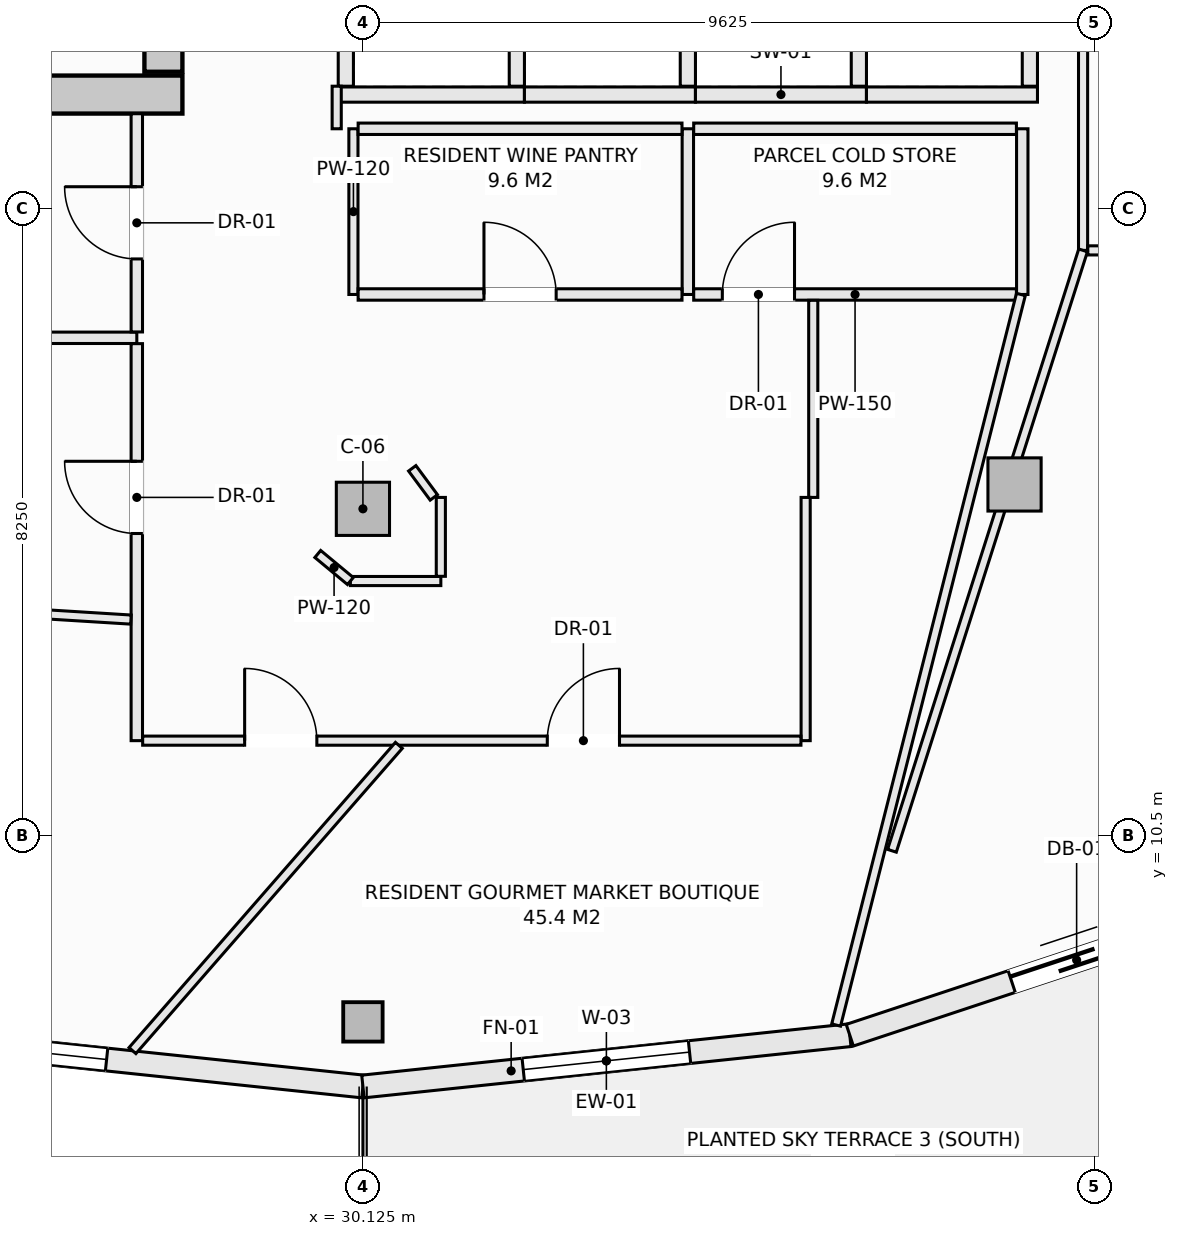
"""IFC4 building model, lengths in metres.
Left out: names, types, materials, properties, quantities, classifications, styles, units other than length and angle.
Written with IfcOpenShell. Run it as: python <this file> out.ifc"""

import sys

from ifc_helpers import new_model, si_unit, direction, frame, frame_2d, origin, origin_2d, place, context, subcontext, project, spatial, rectangle, hollow_rectangle, extrude, element, fill, save


model = new_model("IFC4")
c1 = context("Model", 3, precision=1e-05, world=origin(), true_north=direction((0.0, 1.0)))
c2 = subcontext(c1, "Body", "Model", "MODEL_VIEW")
j1 = project(units=[si_unit("LENGTHUNIT", "METRE"), si_unit("PLANEANGLEUNIT", "RADIAN")], contexts=[c1])
p1 = place(None, origin())
s1 = spatial("IfcSite", under=j1, at=p1, CompositionType="ELEMENT")
p2 = place(p1, origin())
s2 = spatial("IfcBuilding", under=s1, at=p2, CompositionType="ELEMENT")
p3 = place(p2, frame((0.0, 0.0, 236.0)))
s3 = spatial("IfcBuildingStorey", under=s2, at=p3, CompositionType="ELEMENT", Elevation=236.0)
p4 = place(p3, frame((14.25, 20.25, -0.27), z_axis=(0.0, 0.0, 1.0), x_axis=(1.0, 0.0, 0.0)))
e1 = element("IfcWall", 1, at=p4, inside=s3, PredefinedType="SHEAR", context=c2, shape_type="SweptSolid", body=[
    extrude(rectangle(XDim=13.5, YDim=0.5, at=frame_2d((6.75, 0.0))), origin(), (0.0, 0.0, 1.0), 3.3),
])
p5 = place(p3, frame((27.5, 20.55, -0.27), z_axis=(0.0, 0.0, 1.0), x_axis=(0.0, 1.0, 0.0)))
e2 = element("IfcWall", 2, at=p5, inside=s3, PredefinedType="SHEAR", context=c2, shape_type="SweptSolid", body=[
    extrude(rectangle(XDim=1.5, YDim=0.5, at=frame_2d((0.75, 0.0))), origin(), (0.0, 0.0, 1.0), 3.3),
])
p6 = place(p3, frame((30.125, 8.05, -0.27), z_axis=(0.0, 0.0, 1.0), x_axis=(1.0, 0.0, 0.0)))
e3 = element("IfcColumn", 3, at=p6, inside=s3, PredefinedType="COLUMN", context=c2, shape_type="SweptSolid", body=[
    extrude(hollow_rectangle(XDim=0.508, YDim=0.508, WallThickness=0.019, at=origin_2d()), origin(), (0.0, 0.0, 1.0), 3.3),
])
for number, where, z_axis, x_axis in (
    (4, (30.125, 14.8, -0.27), (0.0, 0.0, 1.0), (1.0, 0.0, 0.0)),
    (5, (38.698, 15.121, -0.27), (0.0, 0.0, 1.0), (1.0, 0.0, 0.0)),
):
    element("IfcColumn", number, at=place(p3, frame(where, z_axis=z_axis, x_axis=x_axis)), inside=s3, PredefinedType="COLUMN", context=c2, shape_type="SweptSolid", body=[
        extrude(rectangle(XDim=0.7, YDim=0.7, at=origin_2d()), origin(), (0.0, 0.0, 1.0), 3.3),
    ])
p7 = place(p3, frame((23.719, 7.875, 0.0), z_axis=(0.0, 0.0, 1.0), x_axis=(0.994497142298, -0.104763705363, 0.0)))
e6 = element("IfcWall", 6, at=p7, inside=s3, PredefinedType="SOLIDWALL", context=c2, shape_type="SweptSolid", body=[
    extrude(rectangle(XDim=6.441, YDim=0.3, at=frame_2d((3.221, 0.0))), origin(), (0.0, 0.0, 1.0), 2.605),
])
p8 = place(p7, frame((0.85, 0.0, 0.72)))
e7 = element("IfcOpeningElement", 7, at=p8, cuts=e6, PredefinedType="OPENING", context=c2, shape_type="SweptSolid", body=[
    extrude(rectangle(XDim=2.2, YDim=1.65, at=frame_2d((1.1, 0.825))), frame((0.0, 0.16, 0.0), z_axis=(0.0, -1.0, 0.0), x_axis=(1.0, 0.0, 0.0)), (0.0, 0.0, 1.0), 0.32),
])
p9 = place(p3, frame((30.125, 7.2, 0.0), z_axis=(0.0, 0.0, 1.0), x_axis=(0.994497142298, 0.104763705363, 0.0)))
e8 = element("IfcWall", 8, at=p9, inside=s3, PredefinedType="SOLIDWALL", context=c2, shape_type="SweptSolid", body=[
    extrude(rectangle(XDim=6.441, YDim=0.3, at=frame_2d((3.221, 0.0))), origin(), (0.0, 0.0, 1.0), 2.605),
])
p10 = place(p9, frame((2.121, 0.0, 0.72)))
e9 = element("IfcOpeningElement", 9, at=p10, cuts=e8, PredefinedType="OPENING", context=c2, shape_type="SweptSolid", body=[
    extrude(rectangle(XDim=2.2, YDim=1.65, at=frame_2d((1.1, 0.825))), frame((0.0, 0.16, 0.0), z_axis=(0.0, -1.0, 0.0), x_axis=(1.0, 0.0, 0.0)), (0.0, 0.0, 1.0), 0.32),
])
p11 = place(p3, frame((36.531, 7.875, 0.0), z_axis=(0.0, 0.0, 1.0), x_axis=(0.949240877604, 0.314550085495, 0.0)))
e10 = element("IfcWall", 10, at=p11, inside=s3, PredefinedType="SOLIDWALL", context=c2, shape_type="SweptSolid", body=[
    extrude(rectangle(XDim=6.288, YDim=0.3, at=frame_2d((3.144, 0.0))), origin(), (0.0, 0.0, 1.0), 2.605),
])
p12 = place(p11, frame((2.244, 0.0, 0.0)))
e11 = element("IfcOpeningElement", 11, at=p12, cuts=e10, PredefinedType="OPENING", context=c2, shape_type="SweptSolid", body=[
    extrude(rectangle(XDim=1.8, YDim=2.25, at=frame_2d((0.9, 1.125))), frame((0.0, 0.16, 0.0), z_axis=(0.0, -1.0, 0.0), x_axis=(1.0, 0.0, 0.0)), (0.0, 0.0, 1.0), 0.32),
])
p13 = place(p3, frame((37.565, 4.653, 0.0), z_axis=(0.0, 0.0, 1.0), x_axis=(0.941780086523, 0.336229488042, 0.0)))
e12 = element("IfcWall", 12, at=p13, inside=s3, PredefinedType="PARAPET", context=c2, shape_type="SweptSolid", body=[
    extrude(rectangle(XDim=7.378, YDim=0.22, at=frame_2d((3.689, 0.0))), origin(), (0.0, 0.0, 1.0), 0.52),
])
p14 = place(p3, frame((29.8, 20.25, 0.0), z_axis=(0.0, 0.0, 1.0), x_axis=(1.0, 0.0, 0.0)))
e13 = element("IfcWall", 13, at=p14, inside=s3, PredefinedType="SOLIDWALL", context=c2, shape_type="SweptSolid", body=[
    extrude(rectangle(XDim=2.45, YDim=0.2, at=frame_2d((1.225, 0.0))), origin(), (0.0, 0.0, 1.0), 3.03),
])
for number, where, z_axis, x_axis in (
    (14, (29.9, 20.36, 0.0), (0.0, 0.0, 1.0), (0.0, 1.0, 0.0)),
    (15, (32.15, 20.36, 0.0), (0.0, 0.0, 1.0), (0.0, 1.0, 0.0)),
):
    element("IfcWall", number, at=place(p3, frame(where, z_axis=z_axis, x_axis=x_axis)), inside=s3, PredefinedType="SOLIDWALL", context=c2, shape_type="SweptSolid", body=[
        extrude(rectangle(XDim=2.43, YDim=0.2, at=frame_2d((1.215, 0.0))), origin(), (0.0, 0.0, 1.0), 3.03),
    ])
p15 = place(p3, frame((32.25, 20.25, 0.0), z_axis=(0.0, 0.0, 1.0), x_axis=(1.0, 0.0, 0.0)))
e16 = element("IfcWall", 16, at=p15, inside=s3, PredefinedType="SOLIDWALL", context=c2, shape_type="SweptSolid", body=[
    extrude(rectangle(XDim=2.25, YDim=0.2, at=frame_2d((1.125, 0.0))), origin(), (0.0, 0.0, 1.0), 3.03),
])
p16 = place(p3, frame((34.4, 20.36, 0.0), z_axis=(0.0, 0.0, 1.0), x_axis=(0.0, 1.0, 0.0)))
e17 = element("IfcWall", 17, at=p16, inside=s3, PredefinedType="SOLIDWALL", context=c2, shape_type="SweptSolid", body=[
    extrude(rectangle(XDim=2.43, YDim=0.2, at=frame_2d((1.215, 0.0))), origin(), (0.0, 0.0, 1.0), 3.03),
])
p17 = place(p3, frame((34.5, 20.25, 0.0), z_axis=(0.0, 0.0, 1.0), x_axis=(1.0, 0.0, 0.0)))
e18 = element("IfcWall", 18, at=p17, inside=s3, PredefinedType="SOLIDWALL", context=c2, shape_type="SweptSolid", body=[
    extrude(rectangle(XDim=2.25, YDim=0.2, at=frame_2d((1.125, 0.0))), origin(), (0.0, 0.0, 1.0), 3.03),
])
p18 = place(p3, frame((36.65, 20.36, 0.0), z_axis=(0.0, 0.0, 1.0), x_axis=(0.0, 1.0, 0.0)))
e19 = element("IfcWall", 19, at=p18, inside=s3, PredefinedType="SOLIDWALL", context=c2, shape_type="SweptSolid", body=[
    extrude(rectangle(XDim=2.43, YDim=0.2, at=frame_2d((1.215, 0.0))), origin(), (0.0, 0.0, 1.0), 3.03),
])
p19 = place(p3, frame((36.75, 20.25, 0.0), z_axis=(0.0, 0.0, 1.0), x_axis=(1.0, 0.0, 0.0)))
e20 = element("IfcWall", 20, at=p19, inside=s3, PredefinedType="SOLIDWALL", context=c2, shape_type="SweptSolid", body=[
    extrude(rectangle(XDim=2.25, YDim=0.2, at=frame_2d((1.125, 0.0))), origin(), (0.0, 0.0, 1.0), 3.03),
])
p20 = place(p3, frame((38.9, 20.36, 0.0), z_axis=(0.0, 0.0, 1.0), x_axis=(0.0, 1.0, 0.0)))
e21 = element("IfcWall", 21, at=p20, inside=s3, PredefinedType="SOLIDWALL", context=c2, shape_type="SweptSolid", body=[
    extrude(rectangle(XDim=2.43, YDim=0.2, at=frame_2d((1.215, 0.0))), origin(), (0.0, 0.0, 1.0), 3.03),
])
p21 = place(p3, frame((22.15, 17.05, 0.0), z_axis=(0.0, 0.0, 1.0), x_axis=(1.0, 0.0, 0.0)))
e22 = element("IfcWall", 22, at=p21, inside=s3, PredefinedType="PARTITIONING", context=c2, shape_type="SweptSolid", body=[
    extrude(rectangle(XDim=5.0, YDim=0.15, at=frame_2d((2.5, 0.0))), origin(), (0.0, 0.0, 1.0), 3.03),
])
p22 = place(p3, frame((27.15, 11.75, 0.0), z_axis=(0.0, 0.0, 1.0), x_axis=(0.0, 1.0, 0.0)))
e23 = element("IfcWall", 23, at=p22, inside=s3, PredefinedType="PARTITIONING", context=c2, shape_type="SweptSolid", body=[
    extrude(rectangle(XDim=5.223, YDim=0.15, at=frame_2d((2.611, 0.0))), origin(), (0.0, 0.0, 1.0), 3.03),
])
p23 = place(p22, frame((2.725, 0.0, 0.0)))
e24 = element("IfcOpeningElement", 24, at=p23, cuts=e23, PredefinedType="OPENING", context=c2, shape_type="SweptSolid", body=[
    extrude(rectangle(XDim=0.95, YDim=2.1, at=frame_2d((0.475, 1.05))), frame((0.0, 0.085, 0.0), z_axis=(0.0, -1.0, 0.0), x_axis=(1.0, 0.0, 0.0)), (0.0, 0.0, 1.0), 0.17),
])
p24 = place(p3, frame((27.15, 17.127, 0.0), z_axis=(0.0, 0.0, 1.0), x_axis=(0.0, 1.0, 0.0)))
e25 = element("IfcWall", 25, at=p24, inside=s3, PredefinedType="PARTITIONING", context=c2, shape_type="SweptSolid", body=[
    extrude(rectangle(XDim=2.871, YDim=0.15, at=frame_2d((1.436, 0.0))), origin(), (0.0, 0.0, 1.0), 3.03),
])
p25 = place(p24, frame((0.96, 0.0, 0.0)))
e26 = element("IfcOpeningElement", 26, at=p25, cuts=e25, PredefinedType="OPENING", context=c2, shape_type="SweptSolid", body=[
    extrude(rectangle(XDim=0.95, YDim=2.1, at=frame_2d((0.475, 1.05))), frame((0.0, 0.085, 0.0), z_axis=(0.0, -1.0, 0.0), x_axis=(1.0, 0.0, 0.0)), (0.0, 0.0, 1.0), 0.17),
])
p26 = place(p3, frame((30.0, 17.62, 0.0), z_axis=(0.0, 0.0, 1.0), x_axis=(0.0, 1.0, 0.0)))
e27 = element("IfcWall", 27, at=p26, inside=s3, PredefinedType="PARTITIONING", context=c2, shape_type="SweptSolid", body=[
    extrude(rectangle(XDim=2.18, YDim=0.12, at=frame_2d((1.09, 0.0))), origin(), (0.0, 0.0, 1.0), 3.03),
])
for number, where, z_axis, x_axis in (
    (28, (38.8, 17.62, 0.0), (0.0, 0.0, 1.0), (0.0, 1.0, 0.0)),
    (29, (34.4, 17.62, 0.0), (0.0, 0.0, 1.0), (0.0, 1.0, 0.0)),
):
    element("IfcWall", number, at=place(p3, frame(where, z_axis=z_axis, x_axis=x_axis)), inside=s3, PredefinedType="PARTITIONING", context=c2, shape_type="SweptSolid", body=[
        extrude(rectangle(XDim=2.18, YDim=0.15, at=frame_2d((1.09, 0.0))), origin(), (0.0, 0.0, 1.0), 3.03),
    ])
p27 = place(p3, frame((30.062, 17.62, 0.0), z_axis=(0.0, 0.0, 1.0), x_axis=(1.0, 0.0, 0.0)))
e30 = element("IfcWall", 30, at=p27, inside=s3, PredefinedType="PARTITIONING", context=c2, shape_type="SweptSolid", body=[
    extrude(rectangle(XDim=4.261, YDim=0.15, at=frame_2d((2.13, 0.0))), origin(), (0.0, 0.0, 1.0), 3.03),
])
p28 = place(p27, frame((1.656, 0.0, 0.0)))
e31 = element("IfcOpeningElement", 31, at=p28, cuts=e30, PredefinedType="OPENING", context=c2, shape_type="SweptSolid", body=[
    extrude(rectangle(XDim=0.95, YDim=2.1, at=frame_2d((0.475, 1.05))), frame((0.0, 0.085, 0.0), z_axis=(0.0, -1.0, 0.0), x_axis=(1.0, 0.0, 0.0)), (0.0, 0.0, 1.0), 0.17),
])
p29 = place(p3, frame((34.477, 17.62, 0.0), z_axis=(0.0, 0.0, 1.0), x_axis=(1.0, 0.0, 0.0)))
e32 = element("IfcWall", 32, at=p29, inside=s3, PredefinedType="PARTITIONING", context=c2, shape_type="SweptSolid", body=[
    extrude(rectangle(XDim=4.246, YDim=0.15, at=frame_2d((2.123, 0.0))), origin(), (0.0, 0.0, 1.0), 3.03),
])
p30 = place(p29, frame((0.376, 0.0, 0.0)))
e33 = element("IfcOpeningElement", 33, at=p30, cuts=e32, PredefinedType="OPENING", context=c2, shape_type="SweptSolid", body=[
    extrude(rectangle(XDim=0.95, YDim=2.1, at=frame_2d((0.475, 1.05))), frame((0.0, 0.085, 0.0), z_axis=(0.0, -1.0, 0.0), x_axis=(1.0, 0.0, 0.0)), (0.0, 0.0, 1.0), 0.17),
])
p31 = place(p3, frame((30.062, 19.8, 0.0), z_axis=(0.0, 0.0, 1.0), x_axis=(1.0, 0.0, 0.0)))
e34 = element("IfcWall", 34, at=p31, inside=s3, PredefinedType="PARTITIONING", context=c2, shape_type="SweptSolid", body=[
    extrude(rectangle(XDim=4.261, YDim=0.15, at=frame_2d((2.13, 0.0))), origin(), (0.0, 0.0, 1.0), 3.03),
])
p32 = place(p3, frame((34.477, 19.8, 0.0), z_axis=(0.0, 0.0, 1.0), x_axis=(1.0, 0.0, 0.0)))
e35 = element("IfcWall", 35, at=p32, inside=s3, PredefinedType="PARTITIONING", context=c2, shape_type="SweptSolid", body=[
    extrude(rectangle(XDim=4.246, YDim=0.15, at=frame_2d((2.123, 0.0))), origin(), (0.0, 0.0, 1.0), 3.03),
])
p33 = place(p3, frame((39.6, 18.2, 0.0), z_axis=(0.0, 0.0, 1.0), x_axis=(0.0, 1.0, 0.0)))
e36 = element("IfcWall", 36, at=p33, inside=s3, PredefinedType="PARTITIONING", context=c2, shape_type="SweptSolid", body=[
    extrude(rectangle(XDim=4.82, YDim=0.12, at=frame_2d((2.41, 0.0))), origin(), (0.0, 0.0, 1.0), 3.03),
])
p34 = place(p3, frame((39.662, 18.2, 0.0), z_axis=(0.0, 0.0, 1.0), x_axis=(1.0, 0.0, 0.0)))
e37 = element("IfcWall", 37, at=p34, inside=s3, PredefinedType="PARTITIONING", context=c2, shape_type="SweptSolid", body=[
    extrude(rectangle(XDim=1.796, YDim=0.12, at=frame_2d((0.898, 0.0))), origin(), (0.0, 0.0, 1.0), 2.77),
])
p35 = place(p3, frame((29.78, 19.8, 0.0), z_axis=(0.0, 0.0, 1.0), x_axis=(0.0, 1.0, 0.0)))
e38 = element("IfcWall", 38, at=p35, inside=s3, PredefinedType="PARTITIONING", context=c2, shape_type="SweptSolid", body=[
    extrude(rectangle(XDim=0.56, YDim=0.12, at=frame_2d((0.28, 0.0))), origin(), (0.0, 0.0, 1.0), 3.03),
])
p36 = place(p3, frame((36.05, 14.95, 0.0), z_axis=(0.0, 0.0, 1.0), x_axis=(0.0, 1.0, 0.0)))
e39 = element("IfcWall", 39, at=p36, inside=s3, PredefinedType="PARTITIONING", context=c2, shape_type="SweptSolid", body=[
    extrude(rectangle(XDim=2.593, YDim=0.12, at=frame_2d((1.296, 0.0))), origin(), (0.0, 0.0, 1.0), 3.03),
])
p37 = place(p3, frame((35.95, 11.75, 0.0), z_axis=(0.0, 0.0, 1.0), x_axis=(0.0, 1.0, 0.0)))
e40 = element("IfcWall", 40, at=p37, inside=s3, PredefinedType="PARTITIONING", context=c2, shape_type="SweptSolid", body=[
    extrude(rectangle(XDim=3.2, YDim=0.12, at=frame_2d((1.6, 0.0))), origin(), (0.0, 0.0, 1.0), 3.03),
])
p38 = place(p3, frame((27.227, 11.75, 0.0), z_axis=(0.0, 0.0, 1.0), x_axis=(1.0, 0.0, 0.0)))
e41 = element("IfcWall", 41, at=p38, inside=s3, PredefinedType="PARTITIONING", context=c2, shape_type="SweptSolid", body=[
    extrude(rectangle(XDim=8.661, YDim=0.12, at=frame_2d((4.331, 0.0))), origin(), (0.0, 0.0, 1.0), 3.03),
])
p39 = place(p38, frame((1.342, 0.0, 0.0)))
e42 = element("IfcOpeningElement", 42, at=p39, cuts=e41, PredefinedType="OPENING", context=c2, shape_type="SweptSolid", body=[
    extrude(rectangle(XDim=0.95, YDim=2.1, at=frame_2d((0.475, 1.05))), frame((0.0, 0.07, 0.0), z_axis=(0.0, -1.0, 0.0), x_axis=(1.0, 0.0, 0.0)), (0.0, 0.0, 1.0), 0.14),
])
p40 = place(p38, frame((5.324, 0.0, 0.0)))
e43 = element("IfcOpeningElement", 43, at=p40, cuts=e41, PredefinedType="OPENING", context=c2, shape_type="SweptSolid", body=[
    extrude(rectangle(XDim=0.95, YDim=2.1, at=frame_2d((0.475, 1.05))), frame((0.0, 0.07, 0.0), z_axis=(0.0, -1.0, 0.0), x_axis=(1.0, 0.0, 0.0)), (0.0, 0.0, 1.0), 0.14),
])
p41 = place(p3, frame((29.96, 13.85, 0.0), z_axis=(0.0, 0.0, 1.0), x_axis=(1.0, 0.0, 0.0)))
e44 = element("IfcWall", 44, at=p41, inside=s3, PredefinedType="PARTITIONING", context=c2, shape_type="SweptSolid", body=[
    extrude(rectangle(XDim=1.19, YDim=0.12, at=frame_2d((0.595, 0.0))), origin(), (0.0, 0.0, 1.0), 3.03),
])
p42 = place(p3, frame((31.15, 13.912, 0.0), z_axis=(0.0, 0.0, 1.0), x_axis=(0.0, 1.0, 0.0)))
e45 = element("IfcWall", 45, at=p42, inside=s3, PredefinedType="PARTITIONING", context=c2, shape_type="SweptSolid", body=[
    extrude(rectangle(XDim=1.038, YDim=0.12, at=frame_2d((0.519, 0.0))), origin(), (0.0, 0.0, 1.0), 3.03),
])
p43 = place(p3, frame((30.774, 15.333, 0.0), z_axis=(0.0, 0.0, 1.0), x_axis=(0.595814974861, -0.803121731577, 0.0)))
e46 = element("IfcWall", 46, at=p43, inside=s3, PredefinedType="PARTITIONING", context=c2, shape_type="SweptSolid", body=[
    extrude(rectangle(XDim=0.477, YDim=0.12, at=frame_2d((0.239, 0.0))), origin(), (0.0, 0.0, 1.0), 3.03),
])
p44 = place(p3, frame((29.531, 14.206, 0.0), z_axis=(0.0, 0.0, 1.0), x_axis=(0.7695479554, -0.638589026166, 0.0)))
e47 = element("IfcWall", 47, at=p44, inside=s3, PredefinedType="PARTITIONING", context=c2, shape_type="SweptSolid", body=[
    extrude(rectangle(XDim=0.557, YDim=0.12, at=frame_2d((0.279, 0.0))), origin(), (0.0, 0.0, 1.0), 3.03),
])
p45 = place(p3, frame((14.607, 14.114, 0.0), z_axis=(0.0, 0.0, 1.0), x_axis=(0.998091702445, -0.061749117487, 0.0)))
e48 = element("IfcWall", 48, at=p45, inside=s3, PredefinedType="PARTITIONING", context=c2, shape_type="SweptSolid", body=[
    extrude(rectangle(XDim=12.49, YDim=0.12, at=frame_2d((6.245, 0.0))), origin(), (0.0, 0.0, 1.0), 3.03),
])
p46 = place(p3, frame((27.093, 7.672, 0.0), z_axis=(0.0, 0.0, 1.0), x_axis=(0.657573480864, 0.753390414901, 0.0)))
e49 = element("IfcWall", 49, at=p46, inside=s3, PredefinedType="PARTITIONING", context=c2, shape_type="SweptSolid", body=[
    extrude(rectangle(XDim=5.33, YDim=0.12, at=frame_2d((2.665, 0.0))), origin(), (0.0, 0.0, 1.0), 3.03),
])
p47 = place(p3, frame((36.351, 8.009, 0.0), z_axis=(0.0, 0.0, 1.0), x_axis=(0.245217392178, 0.969468117358, 0.0)))
e50 = element("IfcWall", 50, at=p47, inside=s3, PredefinedType="PARTITIONING", context=c2, shape_type="SweptSolid", body=[
    extrude(rectangle(XDim=9.914, YDim=0.12, at=frame_2d((4.957, 0.0))), origin(), (0.0, 0.0, 1.0), 3.03),
])
p48 = place(p3, frame((37.085, 10.301, 0.0), z_axis=(0.0, 0.0, 1.0), x_axis=(0.30335196171, 0.95287857953, 0.0)))
e51 = element("IfcWall", 51, at=p48, inside=s3, PredefinedType="PARTITIONING", context=c2, shape_type="SweptSolid", body=[
    extrude(rectangle(XDim=8.29, YDim=0.12, at=frame_2d((4.145, 0.0))), origin(), (0.0, 0.0, 1.0), 2.478),
])
p49 = place(p8, origin())
e52 = element("IfcWindow", 52, at=p49, inside=s3, PartitioningType="SINGLE_PANEL", PredefinedType="WINDOW", context=c2, shape_type="SweptSolid", body=[
    extrude(rectangle(XDim=2.2, YDim=1.65, at=frame_2d((1.1, 0.825))), frame((0.0, 0.03, 0.0), z_axis=(0.0, -1.0, 0.0), x_axis=(1.0, 0.0, 0.0)), (0.0, 0.0, 1.0), 0.06),
])
fill(e7, e52)
p50 = place(p10, origin())
e53 = element("IfcWindow", 53, at=p50, inside=s3, PartitioningType="SINGLE_PANEL", PredefinedType="WINDOW", context=c2, shape_type="SweptSolid", body=[
    extrude(rectangle(XDim=2.2, YDim=1.65, at=frame_2d((1.1, 0.825))), frame((0.0, 0.03, 0.0), z_axis=(0.0, -1.0, 0.0), x_axis=(1.0, 0.0, 0.0)), (0.0, 0.0, 1.0), 0.06),
])
fill(e9, e53)
p51 = place(p12, frame((1.8, 0.0, 0.0), z_axis=(0.0, 0.0, 1.0), x_axis=(-1.0, 0.0, 0.0)))
e54 = element("IfcDoor", 54, at=p51, inside=s3, OperationType="SLIDING_TO_LEFT", PredefinedType="DOOR", context=c2, shape_type="SweptSolid", body=[
    extrude(rectangle(XDim=1.8, YDim=2.25, at=frame_2d((0.9, 1.125))), frame((0.0, 0.025, 0.0), z_axis=(0.0, -1.0, 0.0), x_axis=(1.0, 0.0, 0.0)), (0.0, 0.0, 1.0), 0.05),
])
fill(e11, e54)
p52 = place(p25, origin())
e55 = element("IfcDoor", 55, at=p52, inside=s3, OperationType="SINGLE_SWING_RIGHT", PredefinedType="DOOR", context=c2, shape_type="SweptSolid", body=[
    extrude(rectangle(XDim=0.95, YDim=2.1, at=frame_2d((0.475, 1.05))), frame((0.0, 0.025, 0.0), z_axis=(0.0, -1.0, 0.0), x_axis=(1.0, 0.0, 0.0)), (0.0, 0.0, 1.0), 0.05),
])
fill(e26, e55)
p53 = place(p28, origin())
e56 = element("IfcDoor", 56, at=p53, inside=s3, OperationType="SINGLE_SWING_LEFT", PredefinedType="DOOR", context=c2, shape_type="SweptSolid", body=[
    extrude(rectangle(XDim=0.95, YDim=2.1, at=frame_2d((0.475, 1.05))), frame((0.0, 0.025, 0.0), z_axis=(0.0, -1.0, 0.0), x_axis=(1.0, 0.0, 0.0)), (0.0, 0.0, 1.0), 0.05),
])
fill(e31, e56)
p54 = place(p30, origin())
e57 = element("IfcDoor", 57, at=p54, inside=s3, OperationType="SINGLE_SWING_RIGHT", PredefinedType="DOOR", context=c2, shape_type="SweptSolid", body=[
    extrude(rectangle(XDim=0.95, YDim=2.1, at=frame_2d((0.475, 1.05))), frame((0.0, 0.025, 0.0), z_axis=(0.0, -1.0, 0.0), x_axis=(1.0, 0.0, 0.0)), (0.0, 0.0, 1.0), 0.05),
])
fill(e33, e57)
p55 = place(p23, origin())
e58 = element("IfcDoor", 58, at=p55, inside=s3, OperationType="SINGLE_SWING_RIGHT", PredefinedType="DOOR", context=c2, shape_type="SweptSolid", body=[
    extrude(rectangle(XDim=0.95, YDim=2.1, at=frame_2d((0.475, 1.05))), frame((0.0, 0.025, 0.0), z_axis=(0.0, -1.0, 0.0), x_axis=(1.0, 0.0, 0.0)), (0.0, 0.0, 1.0), 0.05),
])
fill(e24, e58)
p56 = place(p39, origin())
e59 = element("IfcDoor", 59, at=p56, inside=s3, OperationType="SINGLE_SWING_LEFT", PredefinedType="DOOR", context=c2, shape_type="SweptSolid", body=[
    extrude(rectangle(XDim=0.95, YDim=2.1, at=frame_2d((0.475, 1.05))), frame((0.0, 0.025, 0.0), z_axis=(0.0, -1.0, 0.0), x_axis=(1.0, 0.0, 0.0)), (0.0, 0.0, 1.0), 0.05),
])
fill(e42, e59)
p57 = place(p40, origin())
e60 = element("IfcDoor", 60, at=p57, inside=s3, OperationType="SINGLE_SWING_RIGHT", PredefinedType="DOOR", context=c2, shape_type="SweptSolid", body=[
    extrude(rectangle(XDim=0.95, YDim=2.1, at=frame_2d((0.475, 1.05))), frame((0.0, 0.025, 0.0), z_axis=(0.0, -1.0, 0.0), x_axis=(1.0, 0.0, 0.0)), (0.0, 0.0, 1.0), 0.05),
])
fill(e43, e60)
save(model, sys.argv[1])
